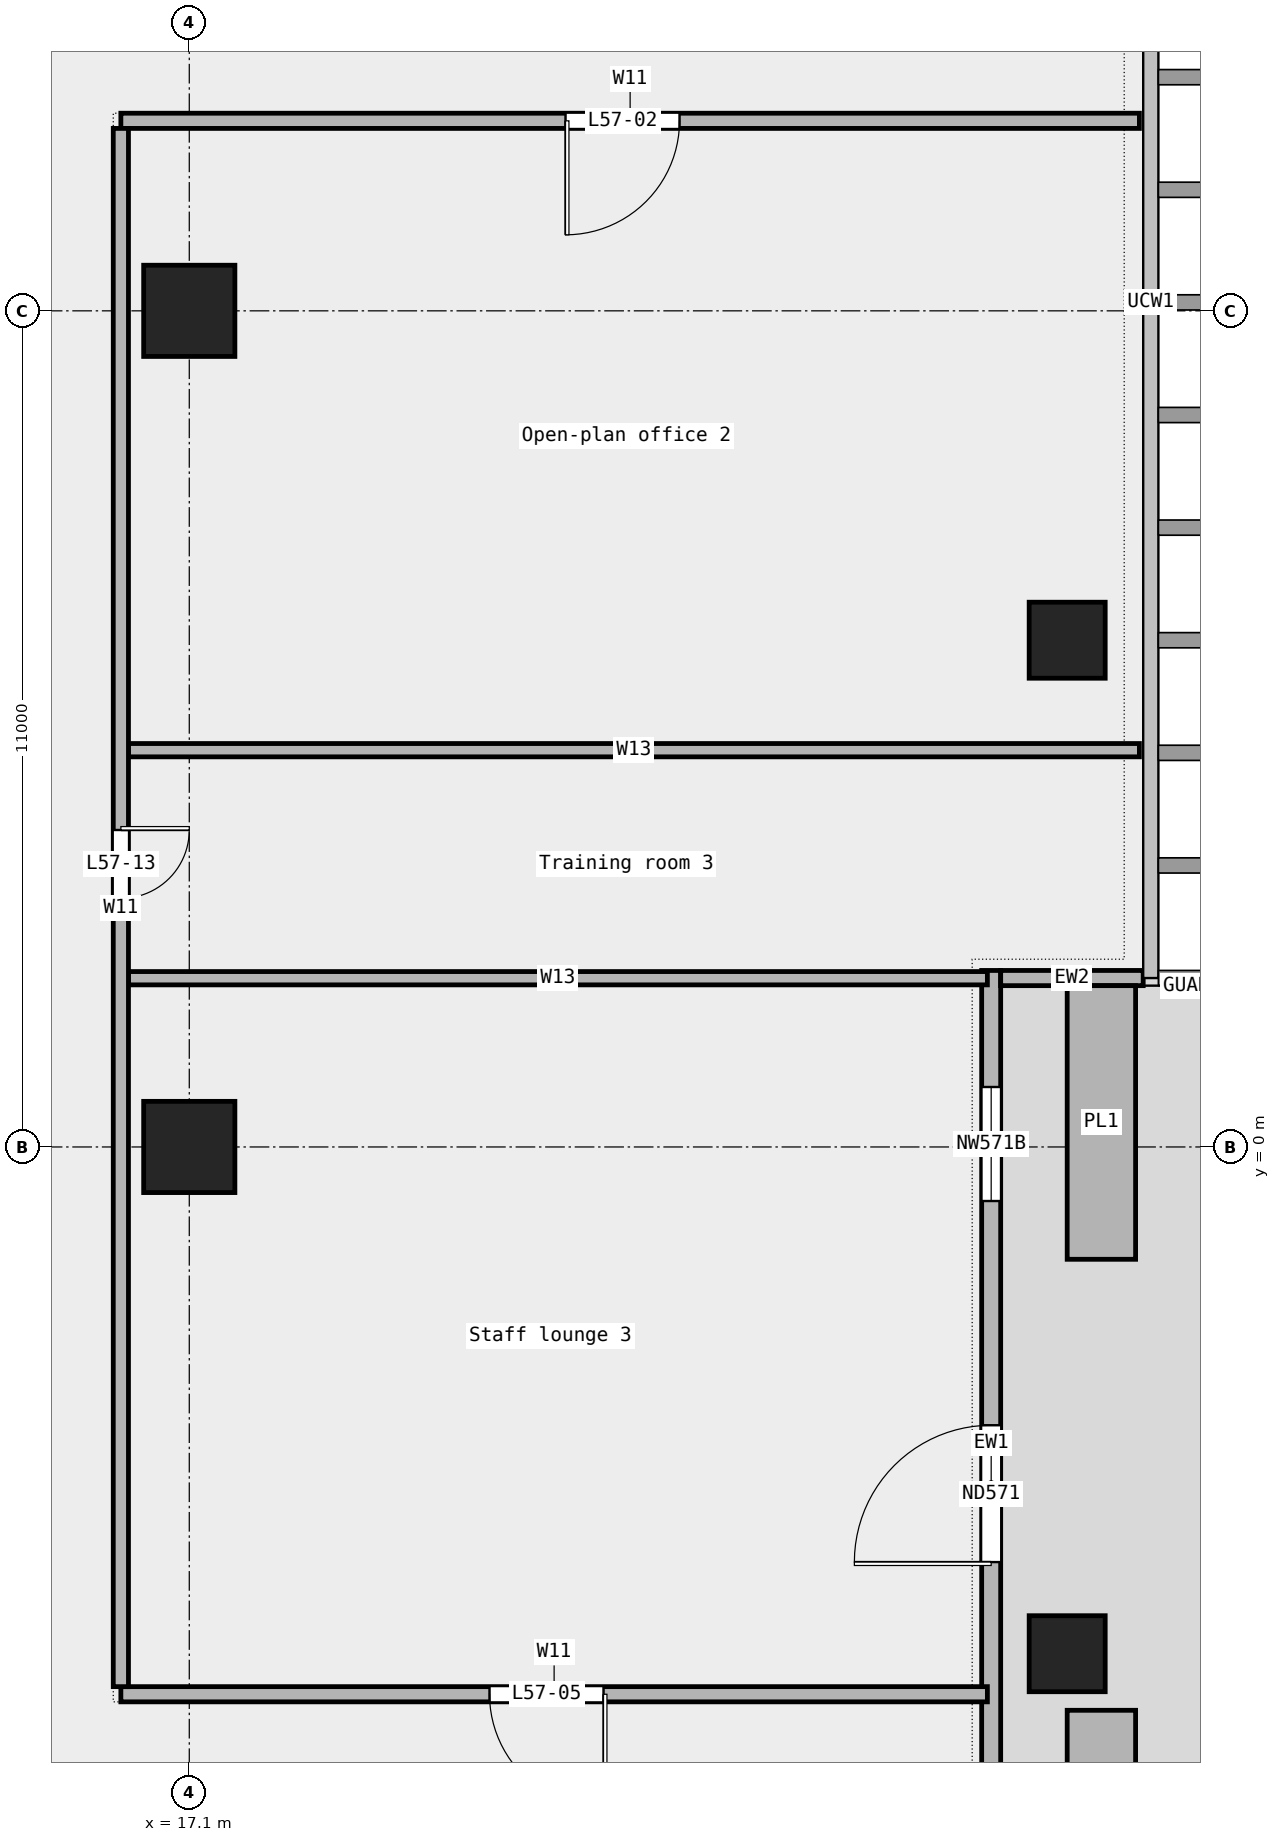
"""IFC4 building model, lengths in metres.
Left out: names, types, materials, properties, quantities, classifications, styles, units other than length and angle.
Written with IfcOpenShell. Run it as: python <this file> out.ifc"""

import sys

from ifc_helpers import new_model, si_unit, direction, frame, frame_2d, origin, origin_2d, place, context, subcontext, project, spatial, rectangle, extrude, element, fill, save


model = new_model("IFC4")
c1 = context("Model", 3, precision=1e-05, world=origin(), true_north=direction((0.0, 1.0)))
c2 = subcontext(c1, "Body", "Model", "MODEL_VIEW")
j1 = project(units=[si_unit("LENGTHUNIT", "METRE"), si_unit("PLANEANGLEUNIT", "RADIAN")], contexts=[c1])
p1 = place(None, origin())
s1 = spatial("IfcSite", under=j1, at=p1, CompositionType="ELEMENT")
p2 = place(p1, origin())
s2 = spatial("IfcBuilding", under=s1, at=p2, CompositionType="ELEMENT")
p3 = place(p2, frame((0.0, 0.0, 267.4)))
s3 = spatial("IfcBuildingStorey", under=s2, at=p3, CompositionType="ELEMENT", Elevation=267.4)
for number, where, z_axis, x_axis in (
    (1, (28.65, -6.667, 0.0), (0.0, 0.0, 1.0), (1.0, 0.0, 0.0)),
    (2, (28.65, 6.667, 0.0), (0.0, 0.0, 1.0), (1.0, 0.0, 0.0)),
):
    element("IfcColumn", number, at=place(p3, frame(where, z_axis=z_axis, x_axis=x_axis)), inside=s3, PredefinedType="COLUMN", context=c2, shape_type="SweptSolid", body=[
        extrude(rectangle(XDim=1.0, YDim=1.0, at=origin_2d()), origin(), (0.0, 0.0, 1.0), 3.6),
    ])
for number, where, z_axis, x_axis in (
    (3, (17.1, 0.0, 0.0), (0.0, 0.0, 1.0), (1.0, 0.0, 0.0)),
    (4, (17.1, 11.0, 0.0), (0.0, 0.0, 1.0), (1.0, 0.0, 0.0)),
):
    element("IfcColumn", number, at=place(p3, frame(where, z_axis=z_axis, x_axis=x_axis)), inside=s3, PredefinedType="COLUMN", context=c2, shape_type="SweptSolid", body=[
        extrude(rectangle(XDim=1.2, YDim=1.2, at=origin_2d()), origin(), (0.0, 0.0, 1.0), 3.6),
    ])
p4 = place(p3, frame((27.65, -11.211, 0.0), z_axis=(0.0, 0.0, 1.0), x_axis=(0.0, 1.0, 0.0)))
e5 = element("IfcWall", 5, at=p4, inside=s3, PredefinedType="STANDARD", context=c2, shape_type="SweptSolid", body=[
    extrude(rectangle(XDim=13.533, YDim=0.25, at=frame_2d((6.767, 0.0))), origin(), (0.0, 0.0, 1.0), 3.6),
])
p5 = place(p4, frame((1.5, 0.0, 0.45)))
e6 = element("IfcOpeningElement", 6, at=p5, cuts=e5, PredefinedType="OPENING", context=c2, shape_type="SweptSolid", body=[
    extrude(rectangle(XDim=1.5, YDim=2.4, at=frame_2d((0.75, 1.2))), frame((0.0, 0.137, 0.0), z_axis=(0.0, -1.0, 0.0), x_axis=(1.0, 0.0, 0.0)), (0.0, 0.0, 1.0), 0.274),
])
p6 = place(p4, frame((5.75, 0.0, 0.0)))
e7 = element("IfcOpeningElement", 7, at=p6, cuts=e5, PredefinedType="OPENING", context=c2, shape_type="SweptSolid", body=[
    extrude(rectangle(XDim=1.8, YDim=2.4, at=frame_2d((0.9, 1.2))), frame((0.0, 0.137, 0.0), z_axis=(0.0, -1.0, 0.0), x_axis=(1.0, 0.0, 0.0)), (0.0, 0.0, 1.0), 0.274),
])
p7 = place(p4, frame((10.5, 0.0, 0.45)))
e8 = element("IfcOpeningElement", 8, at=p7, cuts=e5, PredefinedType="OPENING", context=c2, shape_type="SweptSolid", body=[
    extrude(rectangle(XDim=1.5, YDim=2.4, at=frame_2d((0.75, 1.2))), frame((0.0, 0.137, 0.0), z_axis=(0.0, -1.0, 0.0), x_axis=(1.0, 0.0, 0.0)), (0.0, 0.0, 1.0), 0.274),
])
p8 = place(p3, frame((29.65, 2.222, 0.0), z_axis=(0.0, 0.0, 1.0), x_axis=(-1.0, 0.0, 0.0)))
e9 = element("IfcWall", 9, at=p8, inside=s3, PredefinedType="STANDARD", context=c2, shape_type="SweptSolid", body=[
    extrude(rectangle(XDim=1.875, YDim=0.2, at=frame_2d((0.938, 0.0))), origin(), (0.0, 0.0, 1.0), 3.6),
])
for number, where, z_axis, x_axis in (
    (10, (29.1, -11.011, 0.0), (0.0, 0.0, 1.0), (0.0, 1.0, 0.0)),
    (11, (29.1, -1.478, 0.0), (0.0, 0.0, 1.0), (0.0, 1.0, 0.0)),
):
    element("IfcWall", number, at=place(p3, frame(where, z_axis=z_axis, x_axis=x_axis)), inside=s3, PredefinedType="STANDARD", context=c2, shape_type="SweptSolid", body=[
        extrude(rectangle(XDim=3.6, YDim=0.9, at=frame_2d((1.8, 0.0))), origin(), (0.0, 0.0, 1.0), 0.7),
    ])
p9 = place(p3, frame((16.2, -7.2, 0.0), z_axis=(0.0, 0.0, 1.0), x_axis=(1.0, 0.0, 0.0)))
e12 = element("IfcWall", 12, at=p9, inside=s3, PredefinedType="PARTITIONING", context=c2, shape_type="SweptSolid", body=[
    extrude(rectangle(XDim=11.4, YDim=0.2, at=frame_2d((5.7, 0.0))), origin(), (0.0, 0.0, 1.0), 3.6),
])
p10 = place(p9, frame((4.85, 0.0, 0.0)))
e13 = element("IfcOpeningElement", 13, at=p10, cuts=e12, PredefinedType="OPENING", context=c2, shape_type="SweptSolid", body=[
    extrude(rectangle(XDim=1.5, YDim=2.1, at=frame_2d((0.75, 1.05))), frame((0.0, 0.112, 0.0), z_axis=(0.0, -1.0, 0.0), x_axis=(1.0, 0.0, 0.0)), (0.0, 0.0, 1.0), 0.224),
])
p11 = place(p3, frame((16.3, 2.22, 0.0), z_axis=(0.0, 0.0, 1.0), x_axis=(1.0, 0.0, 0.0)))
e14 = element("IfcWall", 14, at=p11, inside=s3, PredefinedType="PARTITIONING", context=c2, shape_type="SweptSolid", body=[
    extrude(rectangle(XDim=11.3, YDim=0.175, at=frame_2d((5.65, 0.0))), origin(), (0.0, 0.0, 1.0), 3.6),
])
p12 = place(p3, frame((16.3, 5.22, 0.0), z_axis=(0.0, 0.0, 1.0), x_axis=(1.0, 0.0, 0.0)))
e15 = element("IfcWall", 15, at=p12, inside=s3, PredefinedType="PARTITIONING", context=c2, shape_type="SweptSolid", body=[
    extrude(rectangle(XDim=13.3, YDim=0.175, at=frame_2d((6.65, 0.0))), origin(), (0.0, 0.0, 1.0), 3.6),
])
p13 = place(p3, frame((16.2, 13.5, 0.0), z_axis=(0.0, 0.0, 1.0), x_axis=(1.0, 0.0, 0.0)))
e16 = element("IfcWall", 16, at=p13, inside=s3, PredefinedType="PARTITIONING", context=c2, shape_type="SweptSolid", body=[
    extrude(rectangle(XDim=13.4, YDim=0.2, at=frame_2d((6.7, 0.0))), origin(), (0.0, 0.0, 1.0), 3.6),
])
p14 = place(p13, frame((5.85, 0.0, 0.0)))
e17 = element("IfcOpeningElement", 17, at=p14, cuts=e16, PredefinedType="OPENING", context=c2, shape_type="SweptSolid", body=[
    extrude(rectangle(XDim=1.5, YDim=2.1, at=frame_2d((0.75, 1.05))), frame((0.0, 0.112, 0.0), z_axis=(0.0, -1.0, 0.0), x_axis=(1.0, 0.0, 0.0)), (0.0, 0.0, 1.0), 0.224),
])
p15 = place(p3, frame((16.2, -7.1, 0.0), z_axis=(0.0, 0.0, 1.0), x_axis=(0.0, 1.0, 0.0)))
e18 = element("IfcWall", 18, at=p15, inside=s3, PredefinedType="PARTITIONING", context=c2, shape_type="SweptSolid", body=[
    extrude(rectangle(XDim=20.5, YDim=0.2, at=frame_2d((10.25, 0.0))), origin(), (0.0, 0.0, 1.0), 3.6),
])
p16 = place(p15, frame((10.37, 0.0, 0.0)))
e19 = element("IfcOpeningElement", 19, at=p16, cuts=e18, PredefinedType="OPENING", context=c2, shape_type="SweptSolid", body=[
    extrude(rectangle(XDim=0.9, YDim=2.1, at=frame_2d((0.45, 1.05))), frame((0.0, 0.112, 0.0), z_axis=(0.0, -1.0, 0.0), x_axis=(1.0, 0.0, 0.0)), (0.0, 0.0, 1.0), 0.224),
])
p17 = place(p6, origin())
e20 = element("IfcDoor", 20, at=p17, inside=s3, OperationType="DOUBLE_DOOR_SINGLE_SWING", PredefinedType="DOOR", context=c2, shape_type="SweptSolid", body=[
    extrude(rectangle(XDim=1.8, YDim=2.4, at=frame_2d((0.9, 1.2))), frame((0.0, 0.025, 0.0), z_axis=(0.0, -1.0, 0.0), x_axis=(1.0, 0.0, 0.0)), (0.0, 0.0, 1.0), 0.05),
])
fill(e7, e20)
p18 = place(p7, origin())
e21 = element("IfcWindow", 21, at=p18, inside=s3, PartitioningType="SINGLE_PANEL", PredefinedType="WINDOW", context=c2, shape_type="SweptSolid", body=[
    extrude(rectangle(XDim=1.5, YDim=2.4, at=frame_2d((0.75, 1.2))), frame((0.0, 0.03, 0.0), z_axis=(0.0, -1.0, 0.0), x_axis=(1.0, 0.0, 0.0)), (0.0, 0.0, 1.0), 0.06),
])
fill(e8, e21)
p19 = place(p14, origin())
e22 = element("IfcDoor", 22, at=p19, inside=s3, OperationType="DOUBLE_DOOR_SINGLE_SWING", PredefinedType="DOOR", context=c2, shape_type="SweptSolid", body=[
    extrude(rectangle(XDim=1.5, YDim=2.1, at=frame_2d((0.75, 1.05))), frame((0.0, 0.025, 0.0), z_axis=(0.0, -1.0, 0.0), x_axis=(1.0, 0.0, 0.0)), (0.0, 0.0, 1.0), 0.05),
])
fill(e17, e22)
p20 = place(p10, origin())
e23 = element("IfcDoor", 23, at=p20, inside=s3, OperationType="DOUBLE_DOOR_SINGLE_SWING", PredefinedType="DOOR", context=c2, shape_type="SweptSolid", body=[
    extrude(rectangle(XDim=1.5, YDim=2.1, at=frame_2d((0.75, 1.05))), frame((0.0, 0.025, 0.0), z_axis=(0.0, -1.0, 0.0), x_axis=(1.0, 0.0, 0.0)), (0.0, 0.0, 1.0), 0.05),
])
fill(e13, e23)
p21 = place(p16, origin())
e24 = element("IfcDoor", 24, at=p21, inside=s3, OperationType="SINGLE_SWING_LEFT", PredefinedType="DOOR", context=c2, shape_type="SweptSolid", body=[
    extrude(rectangle(XDim=0.9, YDim=2.1, at=frame_2d((0.45, 1.05))), frame((0.0, 0.025, 0.0), z_axis=(0.0, -1.0, 0.0), x_axis=(1.0, 0.0, 0.0)), (0.0, 0.0, 1.0), 0.05),
])
fill(e19, e24)
save(model, sys.argv[1])
